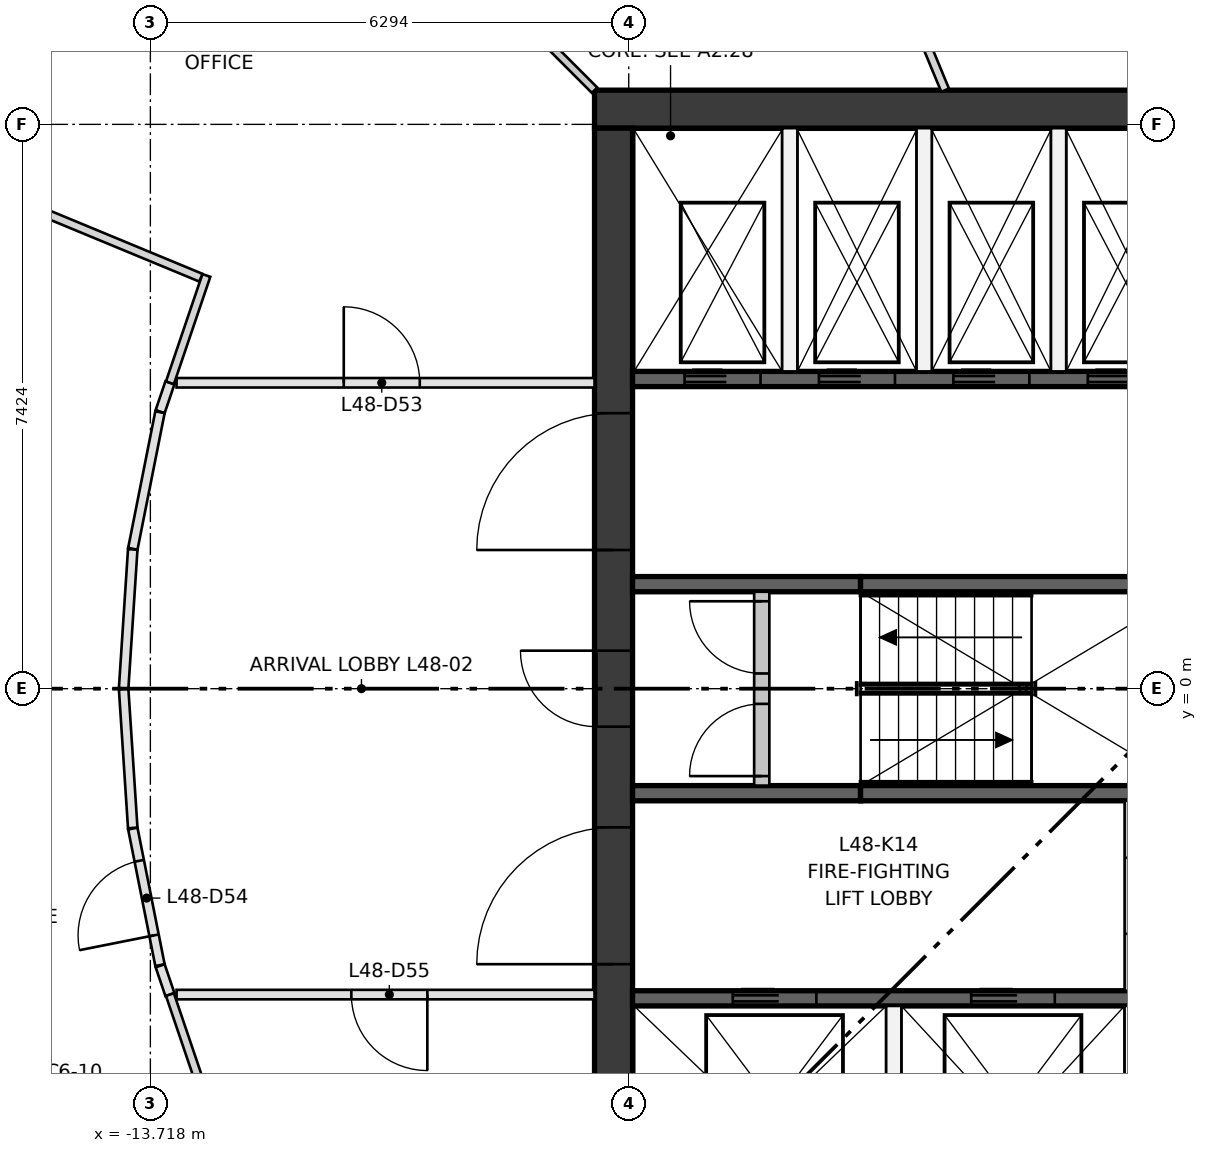
"""IFC4 building model, lengths in metres.
Left out: names, types, materials, properties, quantities, classifications, styles, units other than length and angle.
Written with IfcOpenShell. Run it as: python <this file> out.ifc"""

import sys

from ifc_helpers import new_model, si_unit, direction, frame, frame_2d, origin, place, context, subcontext, project, spatial, rectangle, extrude, element, fill, save


model = new_model("IFC4")
c1 = context("Model", 3, precision=1e-05, world=origin(), true_north=direction((0.0, 1.0)))
c2 = subcontext(c1, "Body", "Model", "MODEL_VIEW")
j1 = project(units=[si_unit("LENGTHUNIT", "METRE"), si_unit("PLANEANGLEUNIT", "RADIAN")], contexts=[c1])
p1 = place(None, origin())
s1 = spatial("IfcSite", under=j1, at=p1, CompositionType="ELEMENT")
p2 = place(p1, origin())
s2 = spatial("IfcBuilding", under=s1, at=p2, CompositionType="ELEMENT")
p3 = place(p2, frame((0.0, 0.0, 180.95)))
s3 = spatial("IfcBuildingStorey", under=s2, at=p3, CompositionType="ELEMENT", Elevation=180.95)
p4 = place(p3, frame((-7.874, 7.624, 0.0), z_axis=(0.0, 0.0, 1.0), x_axis=(1.0, 0.0, 0.0)))
e1 = element("IfcWall", 1, at=p4, inside=s3, PredefinedType="SHEAR", context=c2, shape_type="SweptSolid", body=[
    extrude(rectangle(XDim=15.748, YDim=0.5, at=frame_2d((7.874, 0.0))), origin(), (0.0, 0.0, 1.0), 3.35),
])
p5 = place(p3, frame((-7.624, -7.374, 0.0), z_axis=(0.0, 0.0, 1.0), x_axis=(0.0, 1.0, 0.0)))
e2 = element("IfcWall", 2, at=p5, inside=s3, PredefinedType="SHEAR", context=c2, shape_type="SweptSolid", body=[
    extrude(rectangle(XDim=14.748, YDim=0.5, at=frame_2d((7.374, 0.0))), origin(), (0.0, 0.0, 1.0), 3.35),
])
p6 = place(p5, frame((6.874, 0.0, 0.0)))
e3 = element("IfcOpeningElement", 3, at=p6, cuts=e2, PredefinedType="OPENING", context=c2, shape_type="SweptSolid", body=[
    extrude(rectangle(XDim=1.0, YDim=2.1, at=frame_2d((0.5, 1.05))), frame((0.0, 0.26, 0.0), z_axis=(0.0, -1.0, 0.0), x_axis=(1.0, 0.0, 0.0)), (0.0, 0.0, 1.0), 0.52),
])
p7 = place(p5, frame((3.75, 0.0, 0.0)))
e4 = element("IfcOpeningElement", 4, at=p7, cuts=e2, PredefinedType="OPENING", context=c2, shape_type="SweptSolid", body=[
    extrude(rectangle(XDim=1.8, YDim=2.1, at=frame_2d((0.9, 1.05))), frame((0.0, 0.26, 0.0), z_axis=(0.0, -1.0, 0.0), x_axis=(1.0, 0.0, 0.0)), (0.0, 0.0, 1.0), 0.52),
])
p8 = place(p5, frame((9.198, 0.0, 0.0)))
e5 = element("IfcOpeningElement", 5, at=p8, cuts=e2, PredefinedType="OPENING", context=c2, shape_type="SweptSolid", body=[
    extrude(rectangle(XDim=1.8, YDim=2.1, at=frame_2d((0.9, 1.05))), frame((0.0, 0.26, 0.0), z_axis=(0.0, -1.0, 0.0), x_axis=(1.0, 0.0, 0.0)), (0.0, 0.0, 1.0), 0.52),
])
p9 = place(p3, frame((-7.374, -4.074, 0.0), z_axis=(0.0, 0.0, 1.0), x_axis=(1.0, 0.0, 0.0)))
e6 = element("IfcWall", 6, at=p9, inside=s3, PredefinedType="SHEAR", context=c2, shape_type="SweptSolid", body=[
    extrude(rectangle(XDim=14.748, YDim=0.2, at=frame_2d((7.374, 0.0))), origin(), (0.0, 0.0, 1.0), 3.0),
])
p10 = place(p9, frame((1.319, 0.0, 0.0)))
e7 = element("IfcOpeningElement", 7, at=p10, cuts=e6, PredefinedType="OPENING", context=c2, shape_type="SweptSolid", body=[
    extrude(rectangle(XDim=1.1, YDim=2.1, at=frame_2d((0.55, 1.05))), frame((0.0, 0.11, 0.0), z_axis=(0.0, -1.0, 0.0), x_axis=(1.0, 0.0, 0.0)), (0.0, 0.0, 1.0), 0.22),
])
p11 = place(p9, frame((4.456, 0.0, 0.0)))
e8 = element("IfcOpeningElement", 8, at=p11, cuts=e6, PredefinedType="OPENING", context=c2, shape_type="SweptSolid", body=[
    extrude(rectangle(XDim=1.1, YDim=2.1, at=frame_2d((0.55, 1.05))), frame((0.0, 0.11, 0.0), z_axis=(0.0, -1.0, 0.0), x_axis=(1.0, 0.0, 0.0)), (0.0, 0.0, 1.0), 0.22),
])
p12 = place(p9, frame((7.386, 0.0, 0.0)))
e9 = element("IfcOpeningElement", 9, at=p12, cuts=e6, PredefinedType="OPENING", context=c2, shape_type="SweptSolid", body=[
    extrude(rectangle(XDim=1.0, YDim=2.1, at=frame_2d((0.5, 1.05))), frame((0.0, 0.11, 0.0), z_axis=(0.0, -1.0, 0.0), x_axis=(1.0, 0.0, 0.0)), (0.0, 0.0, 1.0), 0.22),
])
p13 = place(p9, frame((10.009, 0.0, 0.0)))
e10 = element("IfcOpeningElement", 10, at=p13, cuts=e6, PredefinedType="OPENING", context=c2, shape_type="SweptSolid", body=[
    extrude(rectangle(XDim=1.0, YDim=2.1, at=frame_2d((0.5, 1.05))), frame((0.0, 0.11, 0.0), z_axis=(0.0, -1.0, 0.0), x_axis=(1.0, 0.0, 0.0)), (0.0, 0.0, 1.0), 0.22),
])
p14 = place(p9, frame((12.934, 0.0, 0.0)))
e11 = element("IfcOpeningElement", 11, at=p14, cuts=e6, PredefinedType="OPENING", context=c2, shape_type="SweptSolid", body=[
    extrude(rectangle(XDim=0.8, YDim=2.1, at=frame_2d((0.4, 1.05))), frame((0.0, 0.11, 0.0), z_axis=(0.0, -1.0, 0.0), x_axis=(1.0, 0.0, 0.0)), (0.0, 0.0, 1.0), 0.22),
])
p15 = place(p3, frame((-7.374, 4.074, 0.0), z_axis=(0.0, 0.0, 1.0), x_axis=(1.0, 0.0, 0.0)))
e12 = element("IfcWall", 12, at=p15, inside=s3, PredefinedType="SHEAR", context=c2, shape_type="SweptSolid", body=[
    extrude(rectangle(XDim=7.374, YDim=0.2, at=frame_2d((3.687, 0.0))), origin(), (0.0, 0.0, 1.0), 3.0),
])
p16 = place(p15, frame((0.684, 0.0, 0.0)))
e13 = element("IfcOpeningElement", 13, at=p16, cuts=e12, PredefinedType="OPENING", context=c2, shape_type="SweptSolid", body=[
    extrude(rectangle(XDim=1.0, YDim=2.1, at=frame_2d((0.5, 1.05))), frame((0.0, 0.11, 0.0), z_axis=(0.0, -1.0, 0.0), x_axis=(1.0, 0.0, 0.0)), (0.0, 0.0, 1.0), 0.22),
])
p17 = place(p15, frame((2.453, 0.0, 0.0)))
e14 = element("IfcOpeningElement", 14, at=p17, cuts=e12, PredefinedType="OPENING", context=c2, shape_type="SweptSolid", body=[
    extrude(rectangle(XDim=1.0, YDim=2.1, at=frame_2d((0.5, 1.05))), frame((0.0, 0.11, 0.0), z_axis=(0.0, -1.0, 0.0), x_axis=(1.0, 0.0, 0.0)), (0.0, 0.0, 1.0), 0.22),
])
p18 = place(p15, frame((4.221, 0.0, 0.0)))
e15 = element("IfcOpeningElement", 15, at=p18, cuts=e12, PredefinedType="OPENING", context=c2, shape_type="SweptSolid", body=[
    extrude(rectangle(XDim=1.0, YDim=2.1, at=frame_2d((0.5, 1.05))), frame((0.0, 0.11, 0.0), z_axis=(0.0, -1.0, 0.0), x_axis=(1.0, 0.0, 0.0)), (0.0, 0.0, 1.0), 0.22),
])
p19 = place(p15, frame((5.99, 0.0, 0.0)))
e16 = element("IfcOpeningElement", 16, at=p19, cuts=e12, PredefinedType="OPENING", context=c2, shape_type="SweptSolid", body=[
    extrude(rectangle(XDim=1.0, YDim=2.1, at=frame_2d((0.5, 1.05))), frame((0.0, 0.11, 0.0), z_axis=(0.0, -1.0, 0.0), x_axis=(1.0, 0.0, 0.0)), (0.0, 0.0, 1.0), 0.22),
])
p20 = place(p3, frame((-7.374, -1.375, 0.0), z_axis=(0.0, 0.0, 1.0), x_axis=(1.0, 0.0, 0.0)))
e17 = element("IfcWall", 17, at=p20, inside=s3, PredefinedType="SHEAR", context=c2, shape_type="SweptSolid", body=[
    extrude(rectangle(XDim=3.0, YDim=0.2, at=frame_2d((1.5, 0.0))), origin(), (0.0, 0.0, 1.0), 3.0),
])
p21 = place(p3, frame((-4.374, -1.375, 0.0), z_axis=(0.0, 0.0, 1.0), x_axis=(1.0, 0.0, 0.0)))
e18 = element("IfcWall", 18, at=p21, inside=s3, PredefinedType="SHEAR", context=c2, shape_type="SweptSolid", body=[
    extrude(rectangle(XDim=4.374, YDim=0.2, at=frame_2d((2.187, 0.0))), origin(), (0.0, 0.0, 1.0), 3.0),
])
p22 = place(p3, frame((-7.374, 1.375, 0.0), z_axis=(0.0, 0.0, 1.0), x_axis=(1.0, 0.0, 0.0)))
e19 = element("IfcWall", 19, at=p22, inside=s3, PredefinedType="SHEAR", context=c2, shape_type="SweptSolid", body=[
    extrude(rectangle(XDim=3.0, YDim=0.2, at=frame_2d((1.5, 0.0))), origin(), (0.0, 0.0, 1.0), 3.0),
])
p23 = place(p3, frame((-4.374, 1.375, 0.0), z_axis=(0.0, 0.0, 1.0), x_axis=(1.0, 0.0, 0.0)))
e20 = element("IfcWall", 20, at=p23, inside=s3, PredefinedType="SHEAR", context=c2, shape_type="SweptSolid", body=[
    extrude(rectangle(XDim=4.374, YDim=0.2, at=frame_2d((2.187, 0.0))), origin(), (0.0, 0.0, 1.0), 3.0),
])
for number, where, z_axis, x_axis in (
    (21, (-3.937, -7.374, 0.0), (0.0, 0.0, 1.0), (0.0, 1.0, 0.0)),
    (22, (-0.8, -7.374, 0.0), (0.0, 0.0, 1.0), (0.0, 1.0, 0.0)),
):
    element("IfcWall", number, at=place(p3, frame(where, z_axis=z_axis, x_axis=x_axis)), inside=s3, PredefinedType="PARTITIONING", context=c2, shape_type="SweptSolid", body=[
        extrude(rectangle(XDim=3.2, YDim=0.2, at=frame_2d((1.6, 0.0))), origin(), (0.0, 0.0, 1.0), 3.0),
    ])
p24 = place(p3, frame((-0.8, -3.974, 0.0), z_axis=(0.0, 0.0, 1.0), x_axis=(0.0, 1.0, 0.0)))
e23 = element("IfcWall", 23, at=p24, inside=s3, PredefinedType="PARTITIONING", context=c2, shape_type="SweptSolid", body=[
    extrude(rectangle(XDim=2.499, YDim=0.2, at=frame_2d((1.25, 0.0))), origin(), (0.0, 0.0, 1.0), 3.0),
])
p25 = place(p24, frame((0.75, 0.0, 0.0)))
e24 = element("IfcOpeningElement", 24, at=p25, cuts=e23, PredefinedType="OPENING", context=c2, shape_type="SweptSolid", body=[
    extrude(rectangle(XDim=1.0, YDim=2.1, at=frame_2d((0.5, 1.05))), frame((0.0, 0.11, 0.0), z_axis=(0.0, -1.0, 0.0), x_axis=(1.0, 0.0, 0.0)), (0.0, 0.0, 1.0), 0.22),
])
for number, where, z_axis, x_axis in (
    (25, (-5.305, 4.174, 0.0), (0.0, 0.0, 1.0), (0.0, 1.0, 0.0)),
    (26, (-3.537, 4.174, 0.0), (0.0, 0.0, 1.0), (0.0, 1.0, 0.0)),
    (27, (-1.769, 4.174, 0.0), (0.0, 0.0, 1.0), (0.0, 1.0, 0.0)),
):
    element("IfcWall", number, at=place(p3, frame(where, z_axis=z_axis, x_axis=x_axis)), inside=s3, PredefinedType="PARTITIONING", context=c2, shape_type="SweptSolid", body=[
        extrude(rectangle(XDim=3.2, YDim=0.2, at=frame_2d((1.6, 0.0))), origin(), (0.0, 0.0, 1.0), 3.0),
    ])
p26 = place(p3, frame((-5.674, -1.275, 0.0), z_axis=(0.0, 0.0, 1.0), x_axis=(0.0, 1.0, 0.0)))
e28 = element("IfcWall", 28, at=p26, inside=s3, PredefinedType="PARTITIONING", context=c2, shape_type="SweptSolid", body=[
    extrude(rectangle(XDim=2.55, YDim=0.2, at=frame_2d((1.275, 0.0))), origin(), (0.0, 0.0, 1.0), 3.0),
])
p27 = place(p26, frame((0.125, 0.0, 0.0)))
e29 = element("IfcOpeningElement", 29, at=p27, cuts=e28, PredefinedType="OPENING", context=c2, shape_type="SweptSolid", body=[
    extrude(rectangle(XDim=0.95, YDim=2.1, at=frame_2d((0.475, 1.05))), frame((0.0, 0.11, 0.0), z_axis=(0.0, -1.0, 0.0), x_axis=(1.0, 0.0, 0.0)), (0.0, 0.0, 1.0), 0.22),
])
p28 = place(p26, frame((1.475, 0.0, 0.0)))
e30 = element("IfcOpeningElement", 30, at=p28, cuts=e28, PredefinedType="OPENING", context=c2, shape_type="SweptSolid", body=[
    extrude(rectangle(XDim=0.95, YDim=2.1, at=frame_2d((0.475, 1.05))), frame((0.0, 0.11, 0.0), z_axis=(0.0, -1.0, 0.0), x_axis=(1.0, 0.0, 0.0)), (0.0, 0.0, 1.0), 0.22),
])
p29 = place(p3, frame((-13.373, 4.024, 0.0), z_axis=(0.0, 0.0, 1.0), x_axis=(1.0, 0.0, 0.0)))
e31 = element("IfcWall", 31, at=p29, inside=s3, PredefinedType="PARTITIONING", context=c2, shape_type="SweptSolid", body=[
    extrude(rectangle(XDim=5.499, YDim=0.125, at=frame_2d((2.75, 0.0))), origin(), (0.0, 0.0, 1.0), 3.0),
])
p30 = place(p29, frame((2.2, 0.0, 0.0)))
e32 = element("IfcOpeningElement", 32, at=p30, cuts=e31, PredefinedType="OPENING", context=c2, shape_type="SweptSolid", body=[
    extrude(rectangle(XDim=1.0, YDim=2.1, at=frame_2d((0.5, 1.05))), frame((0.0, 0.073, 0.0), z_axis=(0.0, -1.0, 0.0), x_axis=(1.0, 0.0, 0.0)), (0.0, 0.0, 1.0), 0.145),
])
for number, where, z_axis, x_axis in (
    (33, (-14.07, 0.004, 0.0), (0.0, 0.0, 1.0), (0.065, 0.998, 0.0)),
    (34, (-13.95, -1.833, 0.0), (0.0, 0.0, 1.0), (-0.065, 0.998, 0.0)),
    (35, (-13.949, 1.841, 0.0), (0.0, 0.0, 1.0), (0.195, 0.981, 0.0)),
):
    element("IfcWall", number, at=place(p3, frame(where, z_axis=z_axis, x_axis=x_axis)), inside=s3, PredefinedType="PARTITIONING", context=c2, shape_type="SweptSolid", body=[
        extrude(rectangle(XDim=1.832, YDim=0.125, at=frame_2d((0.916, 0.0))), origin(), (0.0, 0.0, 1.0), 3.0),
    ])
p31 = place(p3, frame((-13.591, -3.638, 0.0), z_axis=(0.0, 0.0, 1.0), x_axis=(-0.195065465094, 0.980790224425, 0.0)))
e36 = element("IfcWall", 36, at=p31, inside=s3, PredefinedType="PARTITIONING", context=c2, shape_type="SweptSolid", body=[
    extrude(rectangle(XDim=1.832, YDim=0.125, at=frame_2d((0.916, 0.0))), origin(), (0.0, 0.0, 1.0), 3.0),
])
p32 = place(p31, frame((0.4, 0.0, 0.0)))
e37 = element("IfcOpeningElement", 37, at=p32, cuts=e36, PredefinedType="OPENING", context=c2, shape_type="SweptSolid", body=[
    extrude(rectangle(XDim=1.0, YDim=2.1, at=frame_2d((0.5, 1.05))), frame((0.0, 0.073, 0.0), z_axis=(0.0, -1.0, 0.0), x_axis=(1.0, 0.0, 0.0)), (0.0, 0.0, 1.0), 0.145),
])
for number, where, z_axis, x_axis in (
    (38, (-13.589, 3.646, 0.0), (0.0, 0.0, 1.0), (0.322, 0.947, 0.0)),
    (39, (-13.461, -4.024, 0.0), (0.0, 0.0, 1.0), (-0.322, 0.947, 0.0)),
):
    element("IfcWall", number, at=place(p3, frame(where, z_axis=z_axis, x_axis=x_axis)), inside=s3, PredefinedType="PARTITIONING", context=c2, shape_type="SweptSolid", body=[
        extrude(rectangle(XDim=0.4, YDim=0.125, at=frame_2d((0.2, 0.0))), origin(), (0.0, 0.0, 1.0), 3.0),
    ])
p33 = place(p3, frame((-7.874, -4.024, 0.0), z_axis=(0.0, 0.0, 1.0), x_axis=(-1.0, 0.0, 0.0)))
e40 = element("IfcWall", 40, at=p33, inside=s3, PredefinedType="PARTITIONING", context=c2, shape_type="SweptSolid", body=[
    extrude(rectangle(XDim=5.499, YDim=0.125, at=frame_2d((2.75, 0.0))), origin(), (0.0, 0.0, 1.0), 3.0),
])
p34 = place(p33, frame((2.2, 0.0, 0.0)))
e41 = element("IfcOpeningElement", 41, at=p34, cuts=e40, PredefinedType="OPENING", context=c2, shape_type="SweptSolid", body=[
    extrude(rectangle(XDim=1.0, YDim=2.1, at=frame_2d((0.5, 1.05))), frame((0.0, 0.073, 0.0), z_axis=(0.0, -1.0, 0.0), x_axis=(1.0, 0.0, 0.0)), (0.0, 0.0, 1.0), 0.145),
])
p35 = place(p3, frame((-3.261, 7.874, 0.0), z_axis=(0.0, 0.0, 1.0), x_axis=(-0.382698345407, 0.923873355186, 0.0)))
e42 = element("IfcWall", 42, at=p35, inside=s3, PredefinedType="PARTITIONING", context=c2, shape_type="SweptSolid", body=[
    extrude(rectangle(XDim=5.247, YDim=0.11, at=frame_2d((2.624, 0.0))), origin(), (0.0, 0.0, 1.0), 3.0),
])
p36 = place(p3, frame((-12.403, 12.403, 0.0), z_axis=(0.0, 0.0, 1.0), x_axis=(0.707106781187, -0.707106781187, 0.0)))
e43 = element("IfcWall", 43, at=p36, inside=s3, PredefinedType="PARTITIONING", context=c2, shape_type="SweptSolid", body=[
    extrude(rectangle(XDim=6.404, YDim=0.1, at=frame_2d((3.202, 0.0))), origin(), (0.0, 0.0, 1.0), 3.0),
])
p37 = place(p36, frame((3.0, 0.0, 0.0)))
e44 = element("IfcOpeningElement", 44, at=p37, cuts=e43, PredefinedType="OPENING", context=c2, shape_type="SweptSolid", body=[
    extrude(rectangle(XDim=1.0, YDim=2.1, at=frame_2d((0.5, 1.05))), frame((0.0, 0.06, 0.0), z_axis=(0.0, -1.0, 0.0), x_axis=(1.0, 0.0, 0.0)), (0.0, 0.0, 1.0), 0.12),
])
p38 = place(p3, frame((-13.461, 4.024, 0.0), z_axis=(0.0, 0.0, 1.0), x_axis=(0.321527037068, 0.946900398371, 0.0)))
e45 = element("IfcWall", 45, at=p38, inside=s3, PredefinedType="PARTITIONING", context=c2, shape_type="SweptSolid", body=[
    extrude(rectangle(XDim=1.491, YDim=0.11, at=frame_2d((0.746, 0.0))), origin(), (0.0, 0.0, 1.0), 3.0),
])
p39 = place(p3, frame((-13.053, 5.407, 0.0), z_axis=(0.0, 0.0, 1.0), x_axis=(-0.923881629558, 0.382678369606, 0.0)))
e46 = element("IfcWall", 46, at=p39, inside=s3, PredefinedType="PARTITIONING", context=c2, shape_type="SweptSolid", body=[
    extrude(rectangle(XDim=3.411, YDim=0.11, at=frame_2d((1.706, 0.0))), origin(), (0.0, 0.0, 1.0), 3.0),
])
p40 = place(p3, frame((-13.461, -4.024, 0.0), z_axis=(0.0, 0.0, 1.0), x_axis=(0.321527037068, -0.946900398371, 0.0)))
e47 = element("IfcWall", 47, at=p40, inside=s3, PredefinedType="PARTITIONING", context=c2, shape_type="SweptSolid", body=[
    extrude(rectangle(XDim=1.491, YDim=0.11, at=frame_2d((0.746, 0.0))), origin(), (0.0, 0.0, 1.0), 3.0),
])
p41 = place(p10, origin())
e48 = element("IfcDoor", 48, at=p41, inside=s3, OperationType="DOUBLE_DOOR_SLIDING", PredefinedType="DOOR", context=c2, shape_type="SweptSolid", body=[
    extrude(rectangle(XDim=1.1, YDim=2.1, at=frame_2d((0.55, 1.05))), frame((0.0, 0.025, 0.0), z_axis=(0.0, -1.0, 0.0), x_axis=(1.0, 0.0, 0.0)), (0.0, 0.0, 1.0), 0.05),
])
fill(e7, e48)
p42 = place(p11, origin())
e49 = element("IfcDoor", 49, at=p42, inside=s3, OperationType="DOUBLE_DOOR_SLIDING", PredefinedType="DOOR", context=c2, shape_type="SweptSolid", body=[
    extrude(rectangle(XDim=1.1, YDim=2.1, at=frame_2d((0.55, 1.05))), frame((0.0, 0.025, 0.0), z_axis=(0.0, -1.0, 0.0), x_axis=(1.0, 0.0, 0.0)), (0.0, 0.0, 1.0), 0.05),
])
fill(e8, e49)
p43 = place(p16, frame((1.0, 0.0, 0.0), z_axis=(0.0, 0.0, 1.0), x_axis=(-1.0, 0.0, 0.0)))
e50 = element("IfcDoor", 50, at=p43, inside=s3, OperationType="DOUBLE_DOOR_SLIDING", PredefinedType="DOOR", context=c2, shape_type="SweptSolid", body=[
    extrude(rectangle(XDim=1.0, YDim=2.1, at=frame_2d((0.5, 1.05))), frame((0.0, 0.025, 0.0), z_axis=(0.0, -1.0, 0.0), x_axis=(1.0, 0.0, 0.0)), (0.0, 0.0, 1.0), 0.05),
])
fill(e13, e50)
p44 = place(p17, frame((1.0, 0.0, 0.0), z_axis=(0.0, 0.0, 1.0), x_axis=(-1.0, 0.0, 0.0)))
e51 = element("IfcDoor", 51, at=p44, inside=s3, OperationType="DOUBLE_DOOR_SLIDING", PredefinedType="DOOR", context=c2, shape_type="SweptSolid", body=[
    extrude(rectangle(XDim=1.0, YDim=2.1, at=frame_2d((0.5, 1.05))), frame((0.0, 0.025, 0.0), z_axis=(0.0, -1.0, 0.0), x_axis=(1.0, 0.0, 0.0)), (0.0, 0.0, 1.0), 0.05),
])
fill(e14, e51)
p45 = place(p18, frame((1.0, 0.0, 0.0), z_axis=(0.0, 0.0, 1.0), x_axis=(-1.0, 0.0, 0.0)))
e52 = element("IfcDoor", 52, at=p45, inside=s3, OperationType="DOUBLE_DOOR_SLIDING", PredefinedType="DOOR", context=c2, shape_type="SweptSolid", body=[
    extrude(rectangle(XDim=1.0, YDim=2.1, at=frame_2d((0.5, 1.05))), frame((0.0, 0.025, 0.0), z_axis=(0.0, -1.0, 0.0), x_axis=(1.0, 0.0, 0.0)), (0.0, 0.0, 1.0), 0.05),
])
fill(e15, e52)
p46 = place(p19, frame((1.0, 0.0, 0.0), z_axis=(0.0, 0.0, 1.0), x_axis=(-1.0, 0.0, 0.0)))
e53 = element("IfcDoor", 53, at=p46, inside=s3, OperationType="DOUBLE_DOOR_SLIDING", PredefinedType="DOOR", context=c2, shape_type="SweptSolid", body=[
    extrude(rectangle(XDim=1.0, YDim=2.1, at=frame_2d((0.5, 1.05))), frame((0.0, 0.025, 0.0), z_axis=(0.0, -1.0, 0.0), x_axis=(1.0, 0.0, 0.0)), (0.0, 0.0, 1.0), 0.05),
])
fill(e16, e53)
p47 = place(p27, origin())
e54 = element("IfcDoor", 54, at=p47, inside=s3, OperationType="SINGLE_SWING_LEFT", PredefinedType="DOOR", context=c2, shape_type="SweptSolid", body=[
    extrude(rectangle(XDim=0.95, YDim=2.1, at=frame_2d((0.475, 1.05))), frame((0.0, 0.025, 0.0), z_axis=(0.0, -1.0, 0.0), x_axis=(1.0, 0.0, 0.0)), (0.0, 0.0, 1.0), 0.05),
])
fill(e29, e54)
p48 = place(p28, origin())
e55 = element("IfcDoor", 55, at=p48, inside=s3, OperationType="SINGLE_SWING_RIGHT", PredefinedType="DOOR", context=c2, shape_type="SweptSolid", body=[
    extrude(rectangle(XDim=0.95, YDim=2.1, at=frame_2d((0.475, 1.05))), frame((0.0, 0.025, 0.0), z_axis=(0.0, -1.0, 0.0), x_axis=(1.0, 0.0, 0.0)), (0.0, 0.0, 1.0), 0.05),
])
fill(e30, e55)
p49 = place(p6, origin())
e56 = element("IfcDoor", 56, at=p49, inside=s3, OperationType="SINGLE_SWING_RIGHT", PredefinedType="DOOR", context=c2, shape_type="SweptSolid", body=[
    extrude(rectangle(XDim=1.0, YDim=2.1, at=frame_2d((0.5, 1.05))), frame((0.0, 0.25, 0.0), z_axis=(0.0, -1.0, 0.0), x_axis=(1.0, 0.0, 0.0)), (0.0, 0.0, 1.0), 0.05),
])
fill(e3, e56)
p50 = place(p7, origin())
e57 = element("IfcDoor", 57, at=p50, inside=s3, OperationType="DOUBLE_DOOR_SINGLE_SWING", PredefinedType="DOOR", context=c2, shape_type="SweptSolid", body=[
    extrude(rectangle(XDim=1.8, YDim=2.1, at=frame_2d((0.9, 1.05))), frame((0.0, 0.025, 0.0), z_axis=(0.0, -1.0, 0.0), x_axis=(1.0, 0.0, 0.0)), (0.0, 0.0, 1.0), 0.05),
])
fill(e4, e57)
p51 = place(p8, origin())
e58 = element("IfcDoor", 58, at=p51, inside=s3, OperationType="DOUBLE_DOOR_SINGLE_SWING", PredefinedType="DOOR", context=c2, shape_type="SweptSolid", body=[
    extrude(rectangle(XDim=1.8, YDim=2.1, at=frame_2d((0.9, 1.05))), frame((0.0, 0.025, 0.0), z_axis=(0.0, -1.0, 0.0), x_axis=(1.0, 0.0, 0.0)), (0.0, 0.0, 1.0), 0.05),
])
fill(e5, e58)
p52 = place(p30, origin())
e59 = element("IfcDoor", 59, at=p52, inside=s3, OperationType="SINGLE_SWING_LEFT", PredefinedType="DOOR", context=c2, shape_type="SweptSolid", body=[
    extrude(rectangle(XDim=1.0, YDim=2.1, at=frame_2d((0.5, 1.05))), frame((0.0, 0.025, 0.0), z_axis=(0.0, -1.0, 0.0), x_axis=(1.0, 0.0, 0.0)), (0.0, 0.0, 1.0), 0.05),
])
fill(e32, e59)
p53 = place(p32, origin())
e60 = element("IfcDoor", 60, at=p53, inside=s3, OperationType="SINGLE_SWING_LEFT", PredefinedType="DOOR", context=c2, shape_type="SweptSolid", body=[
    extrude(rectangle(XDim=1.0, YDim=2.1, at=frame_2d((0.5, 1.05))), frame((0.0, 0.025, 0.0), z_axis=(0.0, -1.0, 0.0), x_axis=(1.0, 0.0, 0.0)), (0.0, 0.0, 1.0), 0.05),
])
fill(e37, e60)
p54 = place(p34, origin())
e61 = element("IfcDoor", 61, at=p54, inside=s3, OperationType="SINGLE_SWING_LEFT", PredefinedType="DOOR", context=c2, shape_type="SweptSolid", body=[
    extrude(rectangle(XDim=1.0, YDim=2.1, at=frame_2d((0.5, 1.05))), frame((0.0, 0.025, 0.0), z_axis=(0.0, -1.0, 0.0), x_axis=(1.0, 0.0, 0.0)), (0.0, 0.0, 1.0), 0.05),
])
fill(e41, e61)
save(model, sys.argv[1])
